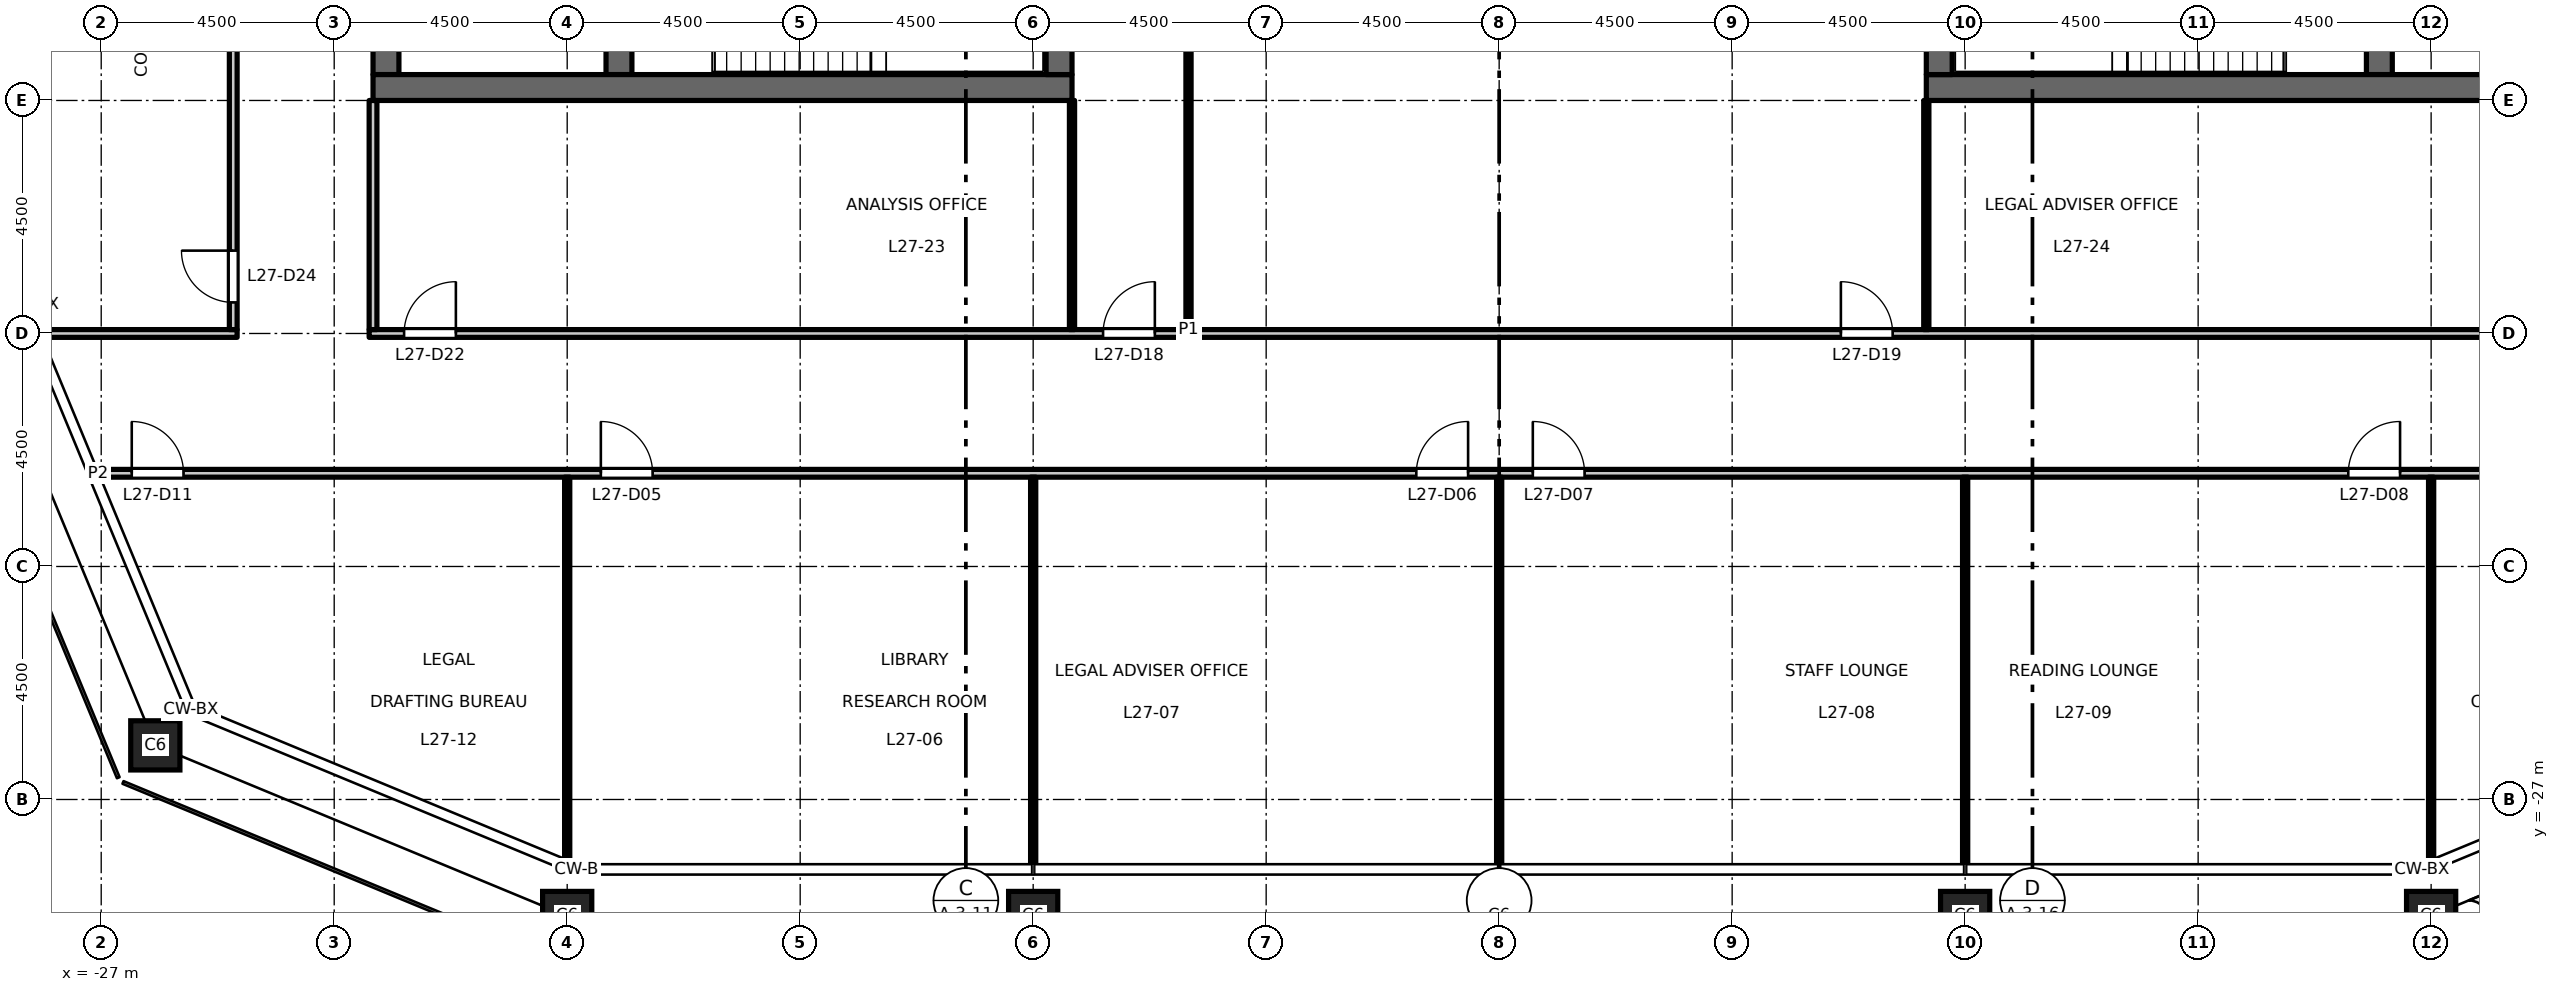
"""IFC4 building model, lengths in metres.
Left out: names, types, materials, properties, quantities, classifications, styles, units other than length and angle.
Written with IfcOpenShell. Run it as: python <this file> out.ifc"""

import sys

from ifc_helpers import new_model, si_unit, direction, frame, frame_2d, origin, origin_2d, place, context, subcontext, project, spatial, rectangle, hollow_rectangle, extrude, element, fill, save


model = new_model("IFC4")
c1 = context("Model", 3, precision=1e-05, world=origin(), true_north=direction((0.0, 1.0)))
c2 = subcontext(c1, "Body", "Model", "MODEL_VIEW")
j1 = project(units=[si_unit("LENGTHUNIT", "METRE"), si_unit("PLANEANGLEUNIT", "RADIAN")], contexts=[c1])
p1 = place(None, origin())
s1 = spatial("IfcSite", under=j1, at=p1, CompositionType="ELEMENT")
p2 = place(p1, origin())
s2 = spatial("IfcBuilding", under=s1, at=p2, CompositionType="ELEMENT")
p3 = place(p2, frame((0.0, 0.0, 127.2)))
s3 = spatial("IfcBuildingStorey", under=s2, at=p3, CompositionType="ELEMENT", Elevation=127.2)
for number, where, z_axis, x_axis in (
    (1, (-18.0, -29.25, 0.0), (0.0, 0.0, 1.0), (1.0, 0.0, 0.0)),
    (2, (-9.0, -29.25, 0.0), (0.0, 0.0, 1.0), (1.0, 0.0, 0.0)),
    (3, (0.0, -29.25, 0.0), (0.0, 0.0, 1.0), (1.0, 0.0, 0.0)),
    (4, (9.0, -29.25, 0.0), (0.0, 0.0, 1.0), (1.0, 0.0, 0.0)),
    (5, (18.0, -29.25, 0.0), (0.0, 0.0, 1.0), (1.0, 0.0, 0.0)),
    (6, (-25.955, -25.955, 0.0), (0.0, 0.0, 1.0), (1.0, 0.0, 0.0)),
):
    element("IfcColumn", number, at=place(p3, frame(where, z_axis=z_axis, x_axis=x_axis)), inside=s3, PredefinedType="COLUMN", context=c2, shape_type="SweptSolid", body=[
        extrude(hollow_rectangle(XDim=0.95, YDim=0.95, WallThickness=0.055, at=origin_2d()), origin(), (0.0, 0.0, 1.0), 4.5),
    ])
p4 = place(p3, frame((-21.5, -13.0, 0.0), z_axis=(0.0, 0.0, 1.0), x_axis=(0.0, 1.0, 0.0)))
e7 = element("IfcWall", 7, at=p4, inside=s3, PredefinedType="SHEAR", context=c2, shape_type="SweptSolid", body=[
    extrude(rectangle(XDim=26.0, YDim=0.5, at=frame_2d((13.0, 0.0))), origin(), (0.0, 0.0, 1.0), 4.35),
])
p5 = place(p4, frame((16.825, 0.0, 0.0)))
e8 = element("IfcOpeningElement", 8, at=p5, cuts=e7, PredefinedType="OPENING", context=c2, shape_type="SweptSolid", body=[
    extrude(rectangle(XDim=1.8, YDim=2.1, at=frame_2d((0.9, 1.05))), frame((0.0, 0.26, 0.0), z_axis=(0.0, -1.0, 0.0), x_axis=(1.0, 0.0, 0.0)), (0.0, 0.0, 1.0), 0.52),
])
p6 = place(p4, frame((7.375, 0.0, 0.0)))
e9 = element("IfcOpeningElement", 9, at=p6, cuts=e7, PredefinedType="OPENING", context=c2, shape_type="SweptSolid", body=[
    extrude(rectangle(XDim=1.8, YDim=2.1, at=frame_2d((0.9, 1.05))), frame((0.0, 0.26, 0.0), z_axis=(0.0, -1.0, 0.0), x_axis=(1.0, 0.0, 0.0)), (0.0, 0.0, 1.0), 0.52),
])
p7 = place(p3, frame((-17.0, -13.0, 0.0), z_axis=(0.0, 0.0, 1.0), x_axis=(0.0, 1.0, 0.0)))
e10 = element("IfcWall", 10, at=p7, inside=s3, PredefinedType="SHEAR", context=c2, shape_type="SweptSolid", body=[
    extrude(rectangle(XDim=6.575, YDim=0.5, at=frame_2d((3.288, 0.0))), origin(), (0.0, 0.0, 1.0), 4.35),
])
p8 = place(p3, frame((-8.25, -13.25, 0.0), z_axis=(0.0, 0.0, 1.0), x_axis=(-1.0, 0.0, 0.0)))
e11 = element("IfcWall", 11, at=p8, inside=s3, PredefinedType="SHEAR", context=c2, shape_type="SweptSolid", body=[
    extrude(rectangle(XDim=13.5, YDim=0.5, at=frame_2d((6.75, 0.0))), origin(), (0.0, 0.0, 1.0), 4.35),
])
p9 = place(p3, frame((-8.5, -13.0, 0.0), z_axis=(0.0, 0.0, 1.0), x_axis=(0.0, 1.0, 0.0)))
e12 = element("IfcWall", 12, at=p9, inside=s3, PredefinedType="SHEAR", context=c2, shape_type="SweptSolid", body=[
    extrude(rectangle(XDim=26.0, YDim=0.5, at=frame_2d((13.0, 0.0))), origin(), (0.0, 0.0, 1.0), 4.35),
])
p10 = place(p3, frame((17.0, -13.0, 0.0), z_axis=(0.0, 0.0, 1.0), x_axis=(0.0, 1.0, 0.0)))
e13 = element("IfcWall", 13, at=p10, inside=s3, PredefinedType="SHEAR", context=c2, shape_type="SweptSolid", body=[
    extrude(rectangle(XDim=6.575, YDim=0.5, at=frame_2d((3.288, 0.0))), origin(), (0.0, 0.0, 1.0), 4.35),
])
p11 = place(p3, frame((8.25, -13.25, 0.0), z_axis=(0.0, 0.0, 1.0), x_axis=(1.0, 0.0, 0.0)))
e14 = element("IfcWall", 14, at=p11, inside=s3, PredefinedType="SHEAR", context=c2, shape_type="SweptSolid", body=[
    extrude(rectangle(XDim=13.5, YDim=0.5, at=frame_2d((6.75, 0.0))), origin(), (0.0, 0.0, 1.0), 4.35),
])
p12 = place(p3, frame((8.5, -13.0, 0.0), z_axis=(0.0, 0.0, 1.0), x_axis=(0.0, 1.0, 0.0)))
e15 = element("IfcWall", 15, at=p12, inside=s3, PredefinedType="SHEAR", context=c2, shape_type="SweptSolid", body=[
    extrude(rectangle(XDim=26.0, YDim=0.5, at=frame_2d((13.0, 0.0))), origin(), (0.0, 0.0, 1.0), 4.35),
])
p13 = place(p3, frame((-27.06, -20.7, 0.0), z_axis=(0.0, 0.0, 1.0), x_axis=(1.0, 0.0, 0.0)))
e16 = element("IfcWall", 16, at=p13, inside=s3, PredefinedType="PARTITIONING", context=c2, shape_type="SweptSolid", body=[
    extrude(rectangle(XDim=54.12, YDim=0.15, at=frame_2d((27.06, 0.0))), origin(), (0.0, 0.0, 1.0), 4.35),
])
p14 = place(p13, frame((9.71, 0.0, 0.0)))
e17 = element("IfcOpeningElement", 17, at=p14, cuts=e16, PredefinedType="OPENING", context=c2, shape_type="SweptSolid", body=[
    extrude(rectangle(XDim=1.0, YDim=2.1, at=frame_2d((0.5, 1.05))), frame((0.0, 0.085, 0.0), z_axis=(0.0, -1.0, 0.0), x_axis=(1.0, 0.0, 0.0)), (0.0, 0.0, 1.0), 0.17),
])
p15 = place(p13, frame((25.46, 0.0, 0.0)))
e18 = element("IfcOpeningElement", 18, at=p15, cuts=e16, PredefinedType="OPENING", context=c2, shape_type="SweptSolid", body=[
    extrude(rectangle(XDim=1.0, YDim=2.1, at=frame_2d((0.5, 1.05))), frame((0.0, 0.085, 0.0), z_axis=(0.0, -1.0, 0.0), x_axis=(1.0, 0.0, 0.0)), (0.0, 0.0, 1.0), 0.17),
])
p16 = place(p13, frame((27.71, 0.0, 0.0)))
e19 = element("IfcOpeningElement", 19, at=p16, cuts=e16, PredefinedType="OPENING", context=c2, shape_type="SweptSolid", body=[
    extrude(rectangle(XDim=1.0, YDim=2.1, at=frame_2d((0.5, 1.05))), frame((0.0, 0.085, 0.0), z_axis=(0.0, -1.0, 0.0), x_axis=(1.0, 0.0, 0.0)), (0.0, 0.0, 1.0), 0.17),
])
p17 = place(p13, frame((43.46, 0.0, 0.0)))
e20 = element("IfcOpeningElement", 20, at=p17, cuts=e16, PredefinedType="OPENING", context=c2, shape_type="SweptSolid", body=[
    extrude(rectangle(XDim=1.0, YDim=2.1, at=frame_2d((0.5, 1.05))), frame((0.0, 0.085, 0.0), z_axis=(0.0, -1.0, 0.0), x_axis=(1.0, 0.0, 0.0)), (0.0, 0.0, 1.0), 0.17),
])
p18 = place(p13, frame((0.65, 0.0, 0.0)))
e21 = element("IfcOpeningElement", 21, at=p18, cuts=e16, PredefinedType="OPENING", context=c2, shape_type="SweptSolid", body=[
    extrude(rectangle(XDim=1.0, YDim=2.1, at=frame_2d((0.5, 1.05))), frame((0.0, 0.085, 0.0), z_axis=(0.0, -1.0, 0.0), x_axis=(1.0, 0.0, 0.0)), (0.0, 0.0, 1.0), 0.17),
])
p19 = place(p13, frame((52.46, 0.0, 0.0)))
e22 = element("IfcOpeningElement", 22, at=p19, cuts=e16, PredefinedType="OPENING", context=c2, shape_type="SweptSolid", body=[
    extrude(rectangle(XDim=1.0, YDim=2.1, at=frame_2d((0.5, 1.05))), frame((0.0, 0.085, 0.0), z_axis=(0.0, -1.0, 0.0), x_axis=(1.0, 0.0, 0.0)), (0.0, 0.0, 1.0), 0.17),
])
p20 = place(p3, frame((-28.178, -18.0, 0.0), z_axis=(0.0, 0.0, 1.0), x_axis=(1.0, 0.0, 0.0)))
e23 = element("IfcWall", 23, at=p20, inside=s3, PredefinedType="PARTITIONING", context=c2, shape_type="SweptSolid", body=[
    extrude(rectangle(XDim=3.803, YDim=0.15, at=frame_2d((1.901, 0.0))), origin(), (0.0, 0.0, 1.0), 4.35),
])
p21 = place(p3, frame((-21.825, -18.0, 0.0), z_axis=(0.0, 0.0, 1.0), x_axis=(1.0, 0.0, 0.0)))
e24 = element("IfcWall", 24, at=p21, inside=s3, PredefinedType="PARTITIONING", context=c2, shape_type="SweptSolid", body=[
    extrude(rectangle(XDim=43.65, YDim=0.15, at=frame_2d((21.825, 0.0))), origin(), (0.0, 0.0, 1.0), 4.35),
])
p22 = place(p21, frame((14.175, 0.0, 0.0)))
e25 = element("IfcOpeningElement", 25, at=p22, cuts=e24, PredefinedType="OPENING", context=c2, shape_type="SweptSolid", body=[
    extrude(rectangle(XDim=1.0, YDim=2.1, at=frame_2d((0.5, 1.05))), frame((0.0, 0.085, 0.0), z_axis=(0.0, -1.0, 0.0), x_axis=(1.0, 0.0, 0.0)), (0.0, 0.0, 1.0), 0.17),
])
p23 = place(p21, frame((28.425, 0.0, 0.0)))
e26 = element("IfcOpeningElement", 26, at=p23, cuts=e24, PredefinedType="OPENING", context=c2, shape_type="SweptSolid", body=[
    extrude(rectangle(XDim=1.0, YDim=2.1, at=frame_2d((0.5, 1.05))), frame((0.0, 0.085, 0.0), z_axis=(0.0, -1.0, 0.0), x_axis=(1.0, 0.0, 0.0)), (0.0, 0.0, 1.0), 0.17),
])
p24 = place(p21, frame((0.675, 0.0, 0.0)))
e27 = element("IfcOpeningElement", 27, at=p24, cuts=e24, PredefinedType="OPENING", context=c2, shape_type="SweptSolid", body=[
    extrude(rectangle(XDim=1.0, YDim=2.1, at=frame_2d((0.5, 1.05))), frame((0.0, 0.085, 0.0), z_axis=(0.0, -1.0, 0.0), x_axis=(1.0, 0.0, 0.0)), (0.0, 0.0, 1.0), 0.17),
])
p25 = place(p21, frame((41.925, 0.0, 0.0)))
e28 = element("IfcOpeningElement", 28, at=p25, cuts=e24, PredefinedType="OPENING", context=c2, shape_type="SweptSolid", body=[
    extrude(rectangle(XDim=1.0, YDim=2.1, at=frame_2d((0.5, 1.05))), frame((0.0, 0.085, 0.0), z_axis=(0.0, -1.0, 0.0), x_axis=(1.0, 0.0, 0.0)), (0.0, 0.0, 1.0), 0.17),
])
p26 = place(p3, frame((-24.45, -17.925, 0.0), z_axis=(0.0, 0.0, 1.0), x_axis=(0.0, 1.0, 0.0)))
e29 = element("IfcWall", 29, at=p26, inside=s3, PredefinedType="PARTITIONING", context=c2, shape_type="SweptSolid", body=[
    extrude(rectangle(XDim=35.85, YDim=0.15, at=frame_2d((17.925, 0.0))), origin(), (0.0, 0.0, 1.0), 4.35),
])
p27 = place(p26, frame((0.525, 0.0, 0.0)))
e30 = element("IfcOpeningElement", 30, at=p27, cuts=e29, PredefinedType="OPENING", context=c2, shape_type="SweptSolid", body=[
    extrude(rectangle(XDim=1.0, YDim=2.1, at=frame_2d((0.5, 1.05))), frame((0.0, 0.085, 0.0), z_axis=(0.0, -1.0, 0.0), x_axis=(1.0, 0.0, 0.0)), (0.0, 0.0, 1.0), 0.17),
])
p28 = place(p26, frame((16.275, 0.0, 0.0)))
e31 = element("IfcOpeningElement", 31, at=p28, cuts=e29, PredefinedType="OPENING", context=c2, shape_type="SweptSolid", body=[
    extrude(rectangle(XDim=1.0, YDim=2.1, at=frame_2d((0.5, 1.05))), frame((0.0, 0.085, 0.0), z_axis=(0.0, -1.0, 0.0), x_axis=(1.0, 0.0, 0.0)), (0.0, 0.0, 1.0), 0.17),
])
p29 = place(p26, frame((18.525, 0.0, 0.0)))
e32 = element("IfcOpeningElement", 32, at=p29, cuts=e29, PredefinedType="OPENING", context=c2, shape_type="SweptSolid", body=[
    extrude(rectangle(XDim=1.0, YDim=2.1, at=frame_2d((0.5, 1.05))), frame((0.0, 0.085, 0.0), z_axis=(0.0, -1.0, 0.0), x_axis=(1.0, 0.0, 0.0)), (0.0, 0.0, 1.0), 0.17),
])
p30 = place(p26, frame((34.275, 0.0, 0.0)))
e33 = element("IfcOpeningElement", 33, at=p30, cuts=e29, PredefinedType="OPENING", context=c2, shape_type="SweptSolid", body=[
    extrude(rectangle(XDim=1.0, YDim=2.1, at=frame_2d((0.5, 1.05))), frame((0.0, 0.085, 0.0), z_axis=(0.0, -1.0, 0.0), x_axis=(1.0, 0.0, 0.0)), (0.0, 0.0, 1.0), 0.17),
])
p31 = place(p3, frame((-21.75, -17.925, 0.0), z_axis=(0.0, 0.0, 1.0), x_axis=(0.0, 1.0, 0.0)))
e34 = element("IfcWall", 34, at=p31, inside=s3, PredefinedType="PARTITIONING", context=c2, shape_type="SweptSolid", body=[
    extrude(rectangle(XDim=4.425, YDim=0.15, at=frame_2d((2.212, 0.0))), origin(), (0.0, 0.0, 1.0), 4.35),
])
p32 = place(p3, frame((-18.0, -28.178, 0.0), z_axis=(0.0, 0.0, 1.0), x_axis=(0.0, 1.0, 0.0)))
e35 = element("IfcWall", 35, at=p32, inside=s3, PredefinedType="PARTITIONING", context=c2, shape_type="SweptSolid", body=[
    extrude(rectangle(XDim=7.403, YDim=0.1, at=frame_2d((3.702, 0.0))), origin(), (0.0, 0.0, 1.0), 3.45),
])
p33 = place(p3, frame((-9.0, -28.26, 0.0), z_axis=(0.0, 0.0, 1.0), x_axis=(0.0, 1.0, 0.0)))
e36 = element("IfcWall", 36, at=p33, inside=s3, PredefinedType="PARTITIONING", context=c2, shape_type="SweptSolid", body=[
    extrude(rectangle(XDim=7.485, YDim=0.1, at=frame_2d((3.743, 0.0))), origin(), (0.0, 0.0, 1.0), 3.45),
])
p34 = place(p3, frame((-8.25, -17.925, 0.0), z_axis=(0.0, 0.0, 1.0), x_axis=(0.0, 1.0, 0.0)))
e37 = element("IfcWall", 37, at=p34, inside=s3, PredefinedType="PARTITIONING", context=c2, shape_type="SweptSolid", body=[
    extrude(rectangle(XDim=4.425, YDim=0.1, at=frame_2d((2.212, 0.0))), origin(), (0.0, 0.0, 1.0), 4.35),
])
p35 = place(p3, frame((-6.0, -17.925, 0.0), z_axis=(0.0, 0.0, 1.0), x_axis=(0.0, 1.0, 0.0)))
e38 = element("IfcWall", 38, at=p35, inside=s3, PredefinedType="PARTITIONING", context=c2, shape_type="SweptSolid", body=[
    extrude(rectangle(XDim=9.275, YDim=0.1, at=frame_2d((4.638, 0.0))), origin(), (0.0, 0.0, 1.0), 4.35),
])
p36 = place(p3, frame((0.0, -28.26, 0.0), z_axis=(0.0, 0.0, 1.0), x_axis=(0.0, 1.0, 0.0)))
e39 = element("IfcWall", 39, at=p36, inside=s3, PredefinedType="PARTITIONING", context=c2, shape_type="SweptSolid", body=[
    extrude(rectangle(XDim=7.485, YDim=0.1, at=frame_2d((3.743, 0.0))), origin(), (0.0, 0.0, 1.0), 3.45),
])
p37 = place(p3, frame((8.25, -17.925, 0.0), z_axis=(0.0, 0.0, 1.0), x_axis=(0.0, 1.0, 0.0)))
e40 = element("IfcWall", 40, at=p37, inside=s3, PredefinedType="PARTITIONING", context=c2, shape_type="SweptSolid", body=[
    extrude(rectangle(XDim=4.425, YDim=0.1, at=frame_2d((2.212, 0.0))), origin(), (0.0, 0.0, 1.0), 4.35),
])
p38 = place(p3, frame((9.0, -28.26, 0.0), z_axis=(0.0, 0.0, 1.0), x_axis=(0.0, 1.0, 0.0)))
e41 = element("IfcWall", 41, at=p38, inside=s3, PredefinedType="PARTITIONING", context=c2, shape_type="SweptSolid", body=[
    extrude(rectangle(XDim=7.485, YDim=0.1, at=frame_2d((3.743, 0.0))), origin(), (0.0, 0.0, 1.0), 3.45),
])
p39 = place(p3, frame((18.0, -28.178, 0.0), z_axis=(0.0, 0.0, 1.0), x_axis=(0.0, 1.0, 0.0)))
e42 = element("IfcWall", 42, at=p39, inside=s3, PredefinedType="PARTITIONING", context=c2, shape_type="SweptSolid", body=[
    extrude(rectangle(XDim=7.403, YDim=0.1, at=frame_2d((3.702, 0.0))), origin(), (0.0, 0.0, 1.0), 3.45),
])
p40 = place(p14, origin())
e43 = element("IfcDoor", 43, at=p40, inside=s3, OperationType="SINGLE_SWING_LEFT", PredefinedType="DOOR", context=c2, shape_type="SweptSolid", body=[
    extrude(rectangle(XDim=1.0, YDim=2.1, at=frame_2d((0.5, 1.05))), frame((0.0, 0.025, 0.0), z_axis=(0.0, -1.0, 0.0), x_axis=(1.0, 0.0, 0.0)), (0.0, 0.0, 1.0), 0.05),
])
fill(e17, e43)
p41 = place(p15, origin())
e44 = element("IfcDoor", 44, at=p41, inside=s3, OperationType="SINGLE_SWING_RIGHT", PredefinedType="DOOR", context=c2, shape_type="SweptSolid", body=[
    extrude(rectangle(XDim=1.0, YDim=2.1, at=frame_2d((0.5, 1.05))), frame((0.0, 0.025, 0.0), z_axis=(0.0, -1.0, 0.0), x_axis=(1.0, 0.0, 0.0)), (0.0, 0.0, 1.0), 0.05),
])
fill(e18, e44)
p42 = place(p16, origin())
e45 = element("IfcDoor", 45, at=p42, inside=s3, OperationType="SINGLE_SWING_LEFT", PredefinedType="DOOR", context=c2, shape_type="SweptSolid", body=[
    extrude(rectangle(XDim=1.0, YDim=2.1, at=frame_2d((0.5, 1.05))), frame((0.0, 0.025, 0.0), z_axis=(0.0, -1.0, 0.0), x_axis=(1.0, 0.0, 0.0)), (0.0, 0.0, 1.0), 0.05),
])
fill(e19, e45)
p43 = place(p17, origin())
e46 = element("IfcDoor", 46, at=p43, inside=s3, OperationType="SINGLE_SWING_RIGHT", PredefinedType="DOOR", context=c2, shape_type="SweptSolid", body=[
    extrude(rectangle(XDim=1.0, YDim=2.1, at=frame_2d((0.5, 1.05))), frame((0.0, 0.025, 0.0), z_axis=(0.0, -1.0, 0.0), x_axis=(1.0, 0.0, 0.0)), (0.0, 0.0, 1.0), 0.05),
])
fill(e20, e46)
p44 = place(p18, origin())
e47 = element("IfcDoor", 47, at=p44, inside=s3, OperationType="SINGLE_SWING_LEFT", PredefinedType="DOOR", context=c2, shape_type="SweptSolid", body=[
    extrude(rectangle(XDim=1.0, YDim=2.1, at=frame_2d((0.5, 1.05))), frame((0.0, 0.025, 0.0), z_axis=(0.0, -1.0, 0.0), x_axis=(1.0, 0.0, 0.0)), (0.0, 0.0, 1.0), 0.05),
])
fill(e21, e47)
p45 = place(p22, origin())
e48 = element("IfcDoor", 48, at=p45, inside=s3, OperationType="SINGLE_SWING_RIGHT", PredefinedType="DOOR", context=c2, shape_type="SweptSolid", body=[
    extrude(rectangle(XDim=1.0, YDim=2.1, at=frame_2d((0.5, 1.05))), frame((0.0, 0.025, 0.0), z_axis=(0.0, -1.0, 0.0), x_axis=(1.0, 0.0, 0.0)), (0.0, 0.0, 1.0), 0.05),
])
fill(e25, e48)
p46 = place(p23, origin())
e49 = element("IfcDoor", 49, at=p46, inside=s3, OperationType="SINGLE_SWING_LEFT", PredefinedType="DOOR", context=c2, shape_type="SweptSolid", body=[
    extrude(rectangle(XDim=1.0, YDim=2.1, at=frame_2d((0.5, 1.05))), frame((0.0, 0.025, 0.0), z_axis=(0.0, -1.0, 0.0), x_axis=(1.0, 0.0, 0.0)), (0.0, 0.0, 1.0), 0.05),
])
fill(e26, e49)
p47 = place(p24, origin())
e50 = element("IfcDoor", 50, at=p47, inside=s3, OperationType="SINGLE_SWING_RIGHT", PredefinedType="DOOR", context=c2, shape_type="SweptSolid", body=[
    extrude(rectangle(XDim=1.0, YDim=2.1, at=frame_2d((0.5, 1.05))), frame((0.0, 0.025, 0.0), z_axis=(0.0, -1.0, 0.0), x_axis=(1.0, 0.0, 0.0)), (0.0, 0.0, 1.0), 0.05),
])
fill(e27, e50)
p48 = place(p27, origin())
e51 = element("IfcDoor", 51, at=p48, inside=s3, OperationType="SINGLE_SWING_RIGHT", PredefinedType="DOOR", context=c2, shape_type="SweptSolid", body=[
    extrude(rectangle(XDim=1.0, YDim=2.1, at=frame_2d((0.5, 1.05))), frame((0.0, 0.025, 0.0), z_axis=(0.0, -1.0, 0.0), x_axis=(1.0, 0.0, 0.0)), (0.0, 0.0, 1.0), 0.05),
])
fill(e30, e51)
save(model, sys.argv[1])
